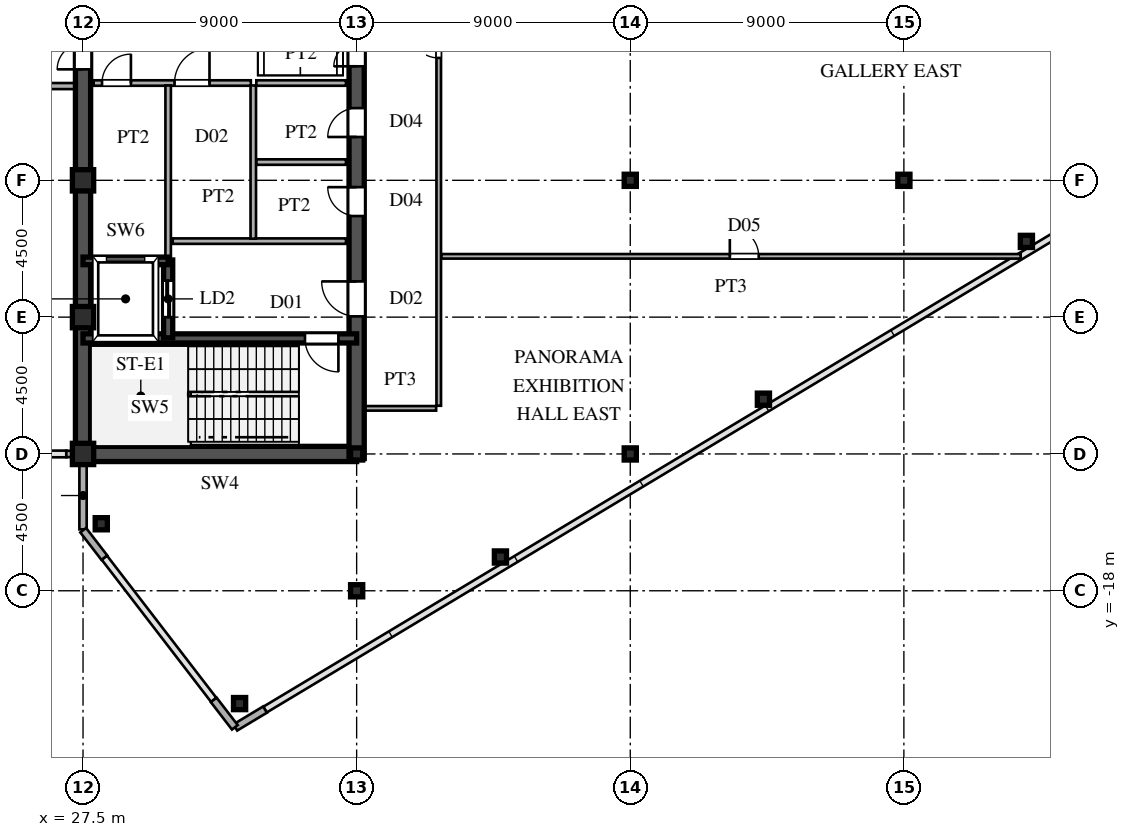
"""IFC4 building model, lengths in metres.
Left out: names, types, materials, properties, quantities, classifications, styles, units other than length and angle.
Written with IfcOpenShell. Run it as: python <this file> out.ifc"""

import sys

from ifc_helpers import new_model, si_unit, direction, frame, frame_2d, origin, origin_2d, place, context, subcontext, project, spatial, rectangle, hollow_rectangle, i_section, extrude, source, transform, mapped, element, fill, save


model = new_model("IFC4")
c1 = context("Model", 3, precision=1e-05, world=origin(), true_north=direction((0.0, 1.0)))
c2 = subcontext(c1, "Body", "Model", "MODEL_VIEW")
j1 = project(units=[si_unit("LENGTHUNIT", "METRE"), si_unit("PLANEANGLEUNIT", "RADIAN")], contexts=[c1])
p1 = place(None, origin())
s1 = spatial("IfcSite", under=j1, at=p1, CompositionType="ELEMENT")
p2 = place(p1, origin())
s2 = spatial("IfcBuilding", under=s1, at=p2, CompositionType="ELEMENT")
p3 = place(p2, frame((0.0, 0.0, 269.4)))
s3 = spatial("IfcBuildingStorey", under=s2, at=p3, CompositionType="ELEMENT", Elevation=269.4)
m1 = source(origin(), c2, "Body", "SweptSolid", [
    extrude(hollow_rectangle(XDim=0.7, YDim=0.7, WallThickness=0.03, at=origin_2d()), origin(), (0.0, 0.0, 1.0), 4.8),
])
for number, where, z_axis, x_axis in (
    (1, (27.5, -13.5, 0.0), (0.0, 0.0, 1.0), (1.0, 0.0, 0.0)),
    (2, (27.5, -9.0, 0.0), (0.0, 0.0, 1.0), (1.0, 0.0, 0.0)),
    (3, (27.5, -4.5, 0.0), (0.0, 0.0, 1.0), (1.0, 0.0, 0.0)),
):
    element("IfcColumn", number, at=place(p3, frame(where, z_axis=z_axis, x_axis=x_axis)), inside=s3, PredefinedType="COLUMN", context=c2, shape_type="MappedRepresentation", body=[
        mapped(m1, transform((0.0, 0.0, 0.0), scale=1.0)),
    ])
m2 = source(origin(), c2, "Body", "SweptSolid", [
    extrude(i_section(OverallWidth=0.4, OverallDepth=0.4, WebThickness=0.013, FlangeThickness=0.021, at=origin_2d()), origin(), (0.0, 0.0, 1.0), 4.8),
])
for number, where, z_axis, x_axis in (
    (4, (36.5, -18.0, 0.0), (0.0, 0.0, 1.0), (1.0, 0.0, 0.0)),
    (5, (36.5, -13.5, 0.0), (0.0, 0.0, 1.0), (1.0, 0.0, 0.0)),
    (6, (45.5, -13.5, 0.0), (0.0, 0.0, 1.0), (1.0, 0.0, 0.0)),
    (7, (45.5, -4.5, 0.0), (0.0, 0.0, 1.0), (1.0, 0.0, 0.0)),
    (8, (54.5, -4.5, 0.0), (0.0, 0.0, 1.0), (1.0, 0.0, 0.0)),
):
    element("IfcColumn", number, at=place(p3, frame(where, z_axis=z_axis, x_axis=x_axis)), inside=s3, PredefinedType="COLUMN", context=c2, shape_type="MappedRepresentation", body=[
        mapped(m2, transform((0.0, 0.0, 0.0), scale=1.0)),
    ])
m3 = source(origin(), c2, "Body", "SweptSolid", [
    extrude(hollow_rectangle(XDim=0.4, YDim=0.4, WallThickness=0.016, at=origin_2d()), origin(), (0.0, 0.0, 1.0), 4.8),
])
for number, where, z_axis, x_axis in (
    (9, (32.65, -21.71, 0.0), (0.0, 0.0, 1.0), (1.0, 0.0, 0.0)),
    (10, (28.1, -15.796, 0.0), (0.0, 0.0, 1.0), (1.0, 0.0, 0.0)),
    (11, (41.23, -16.889, 0.0), (0.0, 0.0, 1.0), (1.0, 0.0, 0.0)),
    (12, (49.88, -11.699, 0.0), (0.0, 0.0, 1.0), (1.0, 0.0, 0.0)),
    (13, (58.53, -6.509, 0.0), (0.0, 0.0, 1.0), (1.0, 0.0, 0.0)),
):
    element("IfcColumn", number, at=place(p3, frame(where, z_axis=z_axis, x_axis=x_axis)), inside=s3, PredefinedType="COLUMN", context=c2, shape_type="MappedRepresentation", body=[
        mapped(m3, transform((0.0, 0.0, 0.0), scale=1.0)),
    ])
p4 = place(p3, frame((32.509, -22.495, 0.0), z_axis=(0.0, 0.0, 1.0), x_axis=(0.85743623509, 0.514590228002, 0.0)))
e14 = element("IfcWall", 14, at=p4, inside=s3, PredefinedType="SOLIDWALL", context=c2, shape_type="SweptSolid", body=[
    extrude(rectangle(XDim=1.14, YDim=0.24, at=frame_2d((0.57, 0.0))), origin(), (0.0, 0.0, 1.0), 4.54),
])
p5 = place(p3, frame((27.5, -15.98, 0.0), z_axis=(0.0, 0.0, 1.0), x_axis=(0.0, 1.0, 0.0)))
e15 = element("IfcWall", 15, at=p5, inside=s3, PredefinedType="SOLIDWALL", context=c2, shape_type="SweptSolid", body=[
    extrude(rectangle(XDim=1.605, YDim=0.24, at=frame_2d((0.803, 0.0))), origin(), (0.0, 0.0, 1.0), 4.54),
])
p6 = place(p3, frame((27.5, -14.375, 0.0), z_axis=(0.0, 0.0, 1.0), x_axis=(0.0, 1.0, 0.0)))
e16 = element("IfcWall", 16, at=p6, inside=s3, PredefinedType="SOLIDWALL", context=c2, shape_type="SweptSolid", body=[
    extrude(rectangle(XDim=0.62, YDim=0.24, at=frame_2d((0.31, 0.0))), origin(), (0.0, 0.0, 1.0), 4.04),
])
for number, where, z_axis, x_axis in (
    (17, (27.506, -16.008, 0.0), (0.0, 0.0, 1.0), (0.61, -0.793, 0.0)),
    (18, (31.799, -21.588, 0.0), (0.0, 0.0, 1.0), (0.61, -0.793, 0.0)),
):
    element("IfcWall", number, at=place(p3, frame(where, z_axis=z_axis, x_axis=x_axis)), inside=s3, PredefinedType="SOLIDWALL", context=c2, shape_type="SweptSolid", body=[
        extrude(rectangle(XDim=1.14, YDim=0.24, at=frame_2d((0.57, 0.0))), origin(), (0.0, 0.0, 1.0), 4.54),
    ])
p7 = place(p3, frame((26.95, -13.5, 0.0), z_axis=(0.0, 0.0, 1.0), x_axis=(1.0, 0.0, 0.0)))
e19 = element("IfcWall", 19, at=p7, inside=s3, PredefinedType="SOLIDWALL", context=c2, shape_type="SweptSolid", body=[
    extrude(rectangle(XDim=0.54, YDim=0.21, at=frame_2d((0.27, 0.0))), origin(), (0.0, 0.0, 1.0), 4.04),
])
p8 = place(p3, frame((27.5, -13.5, 0.0), z_axis=(0.0, 0.0, 1.0), x_axis=(0.0, 1.0, 0.0)))
e20 = element("IfcWall", 20, at=p8, inside=s3, PredefinedType="SHEAR", context=c2, shape_type="SweptSolid", body=[
    extrude(rectangle(XDim=12.2, YDim=0.5, at=frame_2d((6.1, 0.0))), origin(), (0.0, 0.0, 1.0), 4.54),
])
p9 = place(p3, frame((27.5, -1.3, 0.0), z_axis=(0.0, 0.0, 1.0), x_axis=(0.0, 1.0, 0.0)))
e21 = element("IfcWall", 21, at=p9, inside=s3, PredefinedType="SHEAR", context=c2, shape_type="SweptSolid", body=[
    extrude(rectangle(XDim=2.6, YDim=0.5, at=frame_2d((1.3, 0.0))), origin(), (0.0, 0.0, 1.0), 4.54),
])
p10 = place(p9, frame((0.45, 0.0, 0.0)))
e22 = element("IfcOpeningElement", 22, at=p10, cuts=e21, PredefinedType="OPENING", context=c2, shape_type="SweptSolid", body=[
    extrude(rectangle(XDim=1.7, YDim=2.35, at=frame_2d((0.85, 1.175))), frame((0.0, 0.26, 0.0), z_axis=(0.0, -1.0, 0.0), x_axis=(1.0, 0.0, 0.0)), (0.0, 0.0, 1.0), 0.52),
])
p11 = place(p3, frame((27.5, -13.5, 0.0), z_axis=(0.0, 0.0, 1.0), x_axis=(1.0, 0.0, 0.0)))
e23 = element("IfcWall", 23, at=p11, inside=s3, PredefinedType="SHEAR", context=c2, shape_type="SweptSolid", body=[
    extrude(rectangle(XDim=9.0, YDim=0.5, at=frame_2d((4.5, 0.0))), origin(), (0.0, 0.0, 1.0), 4.54),
])
p12 = place(p3, frame((36.5, -13.65, 0.0), z_axis=(0.0, 0.0, 1.0), x_axis=(0.0, 1.0, 0.0)))
e24 = element("IfcWall", 24, at=p12, inside=s3, PredefinedType="SHEAR", context=c2, shape_type="SweptSolid", body=[
    extrude(rectangle(XDim=7.15, YDim=0.5, at=frame_2d((3.575, 0.0))), origin(), (0.0, 0.0, 1.0), 4.54),
])
p13 = place(p12, frame((4.675, 0.0, 0.0)))
e25 = element("IfcOpeningElement", 25, at=p13, cuts=e24, PredefinedType="OPENING", context=c2, shape_type="SweptSolid", body=[
    extrude(rectangle(XDim=1.15, YDim=2.2, at=frame_2d((0.575, 1.1))), frame((0.0, 0.26, 0.0), z_axis=(0.0, -1.0, 0.0), x_axis=(1.0, 0.0, 0.0)), (0.0, 0.0, 1.0), 0.52),
])
p14 = place(p3, frame((36.5, -1.3, 0.0), z_axis=(0.0, 0.0, 1.0), x_axis=(0.0, 1.0, 0.0)))
e26 = element("IfcWall", 26, at=p14, inside=s3, PredefinedType="SHEAR", context=c2, shape_type="SweptSolid", body=[
    extrude(rectangle(XDim=2.6, YDim=0.5, at=frame_2d((1.3, 0.0))), origin(), (0.0, 0.0, 1.0), 4.54),
])
p15 = place(p14, frame((0.55, 0.0, 0.0)))
e27 = element("IfcOpeningElement", 27, at=p15, cuts=e26, PredefinedType="OPENING", context=c2, shape_type="SweptSolid", body=[
    extrude(rectangle(XDim=1.5, YDim=2.3, at=frame_2d((0.75, 1.15))), frame((0.0, 0.26, 0.0), z_axis=(0.0, -1.0, 0.0), x_axis=(1.0, 0.0, 0.0)), (0.0, 0.0, 1.0), 0.52),
])
p16 = place(p3, frame((36.5, -6.5, 0.0), z_axis=(0.0, 0.0, 1.0), x_axis=(0.0, 1.0, 0.0)))
e28 = element("IfcWall", 28, at=p16, inside=s3, PredefinedType="SHEAR", context=c2, shape_type="SweptSolid", body=[
    extrude(rectangle(XDim=2.6, YDim=0.5, at=frame_2d((1.3, 0.0))), origin(), (0.0, 0.0, 1.0), 4.54),
])
p17 = place(p16, frame((0.825, 0.0, 0.0)))
e29 = element("IfcOpeningElement", 29, at=p17, cuts=e28, PredefinedType="OPENING", context=c2, shape_type="SweptSolid", body=[
    extrude(rectangle(XDim=0.95, YDim=2.15, at=frame_2d((0.475, 1.075))), frame((0.0, 0.26, 0.0), z_axis=(0.0, -1.0, 0.0), x_axis=(1.0, 0.0, 0.0)), (0.0, 0.0, 1.0), 0.52),
])
p18 = place(p3, frame((36.5, -3.9, 0.0), z_axis=(0.0, 0.0, 1.0), x_axis=(0.0, 1.0, 0.0)))
e30 = element("IfcWall", 30, at=p18, inside=s3, PredefinedType="SHEAR", context=c2, shape_type="SweptSolid", body=[
    extrude(rectangle(XDim=2.6, YDim=0.5, at=frame_2d((1.3, 0.0))), origin(), (0.0, 0.0, 1.0), 4.54),
])
p19 = place(p18, frame((0.825, 0.0, 0.0)))
e31 = element("IfcOpeningElement", 31, at=p19, cuts=e30, PredefinedType="OPENING", context=c2, shape_type="SweptSolid", body=[
    extrude(rectangle(XDim=0.95, YDim=2.15, at=frame_2d((0.475, 1.075))), frame((0.0, 0.26, 0.0), z_axis=(0.0, -1.0, 0.0), x_axis=(1.0, 0.0, 0.0)), (0.0, 0.0, 1.0), 0.52),
])
p20 = place(p3, frame((27.5, -9.7, 0.0), z_axis=(0.0, 0.0, 1.0), x_axis=(1.0, 0.0, 0.0)))
e32 = element("IfcWall", 32, at=p20, inside=s3, PredefinedType="SHEAR", context=c2, shape_type="SweptSolid", body=[
    extrude(rectangle(XDim=9.0, YDim=0.3, at=frame_2d((4.5, 0.0))), origin(), (0.0, 0.0, 1.0), 4.54),
])
p21 = place(p20, frame((7.3, 0.0, 0.0)))
e33 = element("IfcOpeningElement", 33, at=p21, cuts=e32, PredefinedType="OPENING", context=c2, shape_type="SweptSolid", body=[
    extrude(rectangle(XDim=1.1, YDim=2.2, at=frame_2d((0.55, 1.1))), frame((0.0, 0.16, 0.0), z_axis=(0.0, -1.0, 0.0), x_axis=(1.0, 0.0, 0.0)), (0.0, 0.0, 1.0), 0.32),
])
p22 = place(p3, frame((27.5, -7.15, 0.0), z_axis=(0.0, 0.0, 1.0), x_axis=(1.0, 0.0, 0.0)))
e34 = element("IfcWall", 34, at=p22, inside=s3, PredefinedType="SHEAR", context=c2, shape_type="SweptSolid", body=[
    extrude(rectangle(XDim=2.8, YDim=0.25, at=frame_2d((1.4, 0.0))), origin(), (0.0, 0.0, 1.0), 4.54),
])
p23 = place(p3, frame((30.3, -9.68, 0.0), z_axis=(0.0, 0.0, 1.0), x_axis=(0.0, 1.0, 0.0)))
e35 = element("IfcWall", 35, at=p23, inside=s3, PredefinedType="SHEAR", context=c2, shape_type="SweptSolid", body=[
    extrude(rectangle(XDim=2.56, YDim=0.3, at=frame_2d((1.28, 0.0))), origin(), (0.0, 0.0, 1.0), 4.54),
])
p24 = place(p23, frame((0.68, 0.0, 0.0)))
e36 = element("IfcOpeningElement", 36, at=p24, cuts=e35, PredefinedType="OPENING", context=c2, shape_type="SweptSolid", body=[
    extrude(rectangle(XDim=1.2, YDim=2.25, at=frame_2d((0.6, 1.125))), frame((0.0, 0.16, 0.0), z_axis=(0.0, -1.0, 0.0), x_axis=(1.0, 0.0, 0.0)), (0.0, 0.0, 1.0), 0.32),
])
p25 = place(p3, frame((30.45, -6.5, 0.0), z_axis=(0.0, 0.0, 1.0), x_axis=(1.0, 0.0, 0.0)))
e37 = element("IfcWall", 37, at=p25, inside=s3, PredefinedType="PARTITIONING", context=c2, shape_type="SweptSolid", body=[
    extrude(rectangle(XDim=5.7, YDim=0.18, at=frame_2d((2.85, 0.0))), origin(), (0.0, 0.0, 1.0), 4.54),
])
p26 = place(p3, frame((33.1, -6.42, 0.0), z_axis=(0.0, 0.0, 1.0), x_axis=(0.0, 1.0, 0.0)))
e38 = element("IfcWall", 38, at=p26, inside=s3, PredefinedType="PARTITIONING", context=c2, shape_type="SweptSolid", body=[
    extrude(rectangle(XDim=5.04, YDim=0.18, at=frame_2d((2.52, 0.0))), origin(), (0.0, 0.0, 1.0), 4.54),
])
p27 = place(p3, frame((27.85, -1.3, 0.0), z_axis=(0.0, 0.0, 1.0), x_axis=(1.0, 0.0, 0.0)))
e39 = element("IfcWall", 39, at=p27, inside=s3, PredefinedType="PARTITIONING", context=c2, shape_type="SweptSolid", body=[
    extrude(rectangle(XDim=2.45, YDim=0.18, at=frame_2d((1.225, 0.0))), origin(), (0.0, 0.0, 1.0), 4.54),
])
p28 = place(p27, frame((0.275, 0.0, 0.0)))
e40 = element("IfcOpeningElement", 40, at=p28, cuts=e39, PredefinedType="OPENING", context=c2, shape_type="SweptSolid", body=[
    extrude(rectangle(XDim=0.95, YDim=2.15, at=frame_2d((0.475, 1.075))), frame((0.0, 0.1, 0.0), z_axis=(0.0, -1.0, 0.0), x_axis=(1.0, 0.0, 0.0)), (0.0, 0.0, 1.0), 0.2),
])
p29 = place(p3, frame((30.3, -1.3, 0.0), z_axis=(0.0, 0.0, 1.0), x_axis=(1.0, 0.0, 0.0)))
e41 = element("IfcWall", 41, at=p29, inside=s3, PredefinedType="PARTITIONING", context=c2, shape_type="SweptSolid", body=[
    extrude(rectangle(XDim=2.72, YDim=0.18, at=frame_2d((1.36, 0.0))), origin(), (0.0, 0.0, 1.0), 4.54),
])
p30 = place(p29, frame((0.21, 0.0, 0.0)))
e42 = element("IfcOpeningElement", 42, at=p30, cuts=e41, PredefinedType="OPENING", context=c2, shape_type="SweptSolid", body=[
    extrude(rectangle(XDim=1.15, YDim=2.2, at=frame_2d((0.575, 1.1))), frame((0.0, 0.1, 0.0), z_axis=(0.0, -1.0, 0.0), x_axis=(1.0, 0.0, 0.0)), (0.0, 0.0, 1.0), 0.2),
])
p31 = place(p3, frame((30.3, -7.12, 0.0), z_axis=(0.0, 0.0, 1.0), x_axis=(0.0, 1.0, 0.0)))
e43 = element("IfcWall", 43, at=p31, inside=s3, PredefinedType="PARTITIONING", context=c2, shape_type="SweptSolid", body=[
    extrude(rectangle(XDim=5.74, YDim=0.18, at=frame_2d((2.87, 0.0))), origin(), (0.0, 0.0, 1.0), 4.54),
])
for number, where, z_axis, x_axis in (
    (44, (33.2, -1.3, 0.0), (0.0, 0.0, 1.0), (1.0, 0.0, 0.0)),
    (45, (33.2, -3.9, 0.0), (0.0, 0.0, 1.0), (1.0, 0.0, 0.0)),
):
    element("IfcWall", number, at=place(p3, frame(where, z_axis=z_axis, x_axis=x_axis)), inside=s3, PredefinedType="PARTITIONING", context=c2, shape_type="SweptSolid", body=[
        extrude(rectangle(XDim=2.95, YDim=0.18, at=frame_2d((1.475, 0.0))), origin(), (0.0, 0.0, 1.0), 4.54),
    ])
p32 = place(p3, frame((36.755, -12.0, 0.0), z_axis=(0.0, 0.0, 1.0), x_axis=(1.0, 0.0, 0.0)))
e46 = element("IfcWall", 46, at=p32, inside=s3, PredefinedType="PARTITIONING", context=c2, shape_type="SweptSolid", body=[
    extrude(rectangle(XDim=2.36, YDim=0.15, at=frame_2d((1.18, 0.0))), origin(), (0.0, 0.0, 1.0), 4.54),
])
p33 = place(p3, frame((39.285, -7.0, 0.0), z_axis=(0.0, 0.0, 1.0), x_axis=(1.0, 0.0, 0.0)))
e47 = element("IfcWall", 47, at=p33, inside=s3, PredefinedType="PARTITIONING", context=c2, shape_type="SweptSolid", body=[
    extrude(rectangle(XDim=19.058, YDim=0.15, at=frame_2d((9.529, 0.0))), origin(), (0.0, 0.0, 1.0), 4.54),
])
p34 = place(p33, frame((9.49, 0.0, 0.0)))
e48 = element("IfcOpeningElement", 48, at=p34, cuts=e47, PredefinedType="OPENING", context=c2, shape_type="SweptSolid", body=[
    extrude(rectangle(XDim=0.95, YDim=2.15, at=frame_2d((0.475, 1.075))), frame((0.0, 0.085, 0.0), z_axis=(0.0, -1.0, 0.0), x_axis=(1.0, 0.0, 0.0)), (0.0, 0.0, 1.0), 0.17),
])
p35 = place(p3, frame((-27.245, -1.4, 0.0), z_axis=(0.0, 0.0, 1.0), x_axis=(1.0, 0.0, 0.0)))
e49 = element("IfcWall", 49, at=p35, inside=s3, PredefinedType="PARTITIONING", context=c2, shape_type="SweptSolid", body=[
    extrude(rectangle(XDim=54.49, YDim=0.2, at=frame_2d((27.245, 0.0))), origin(), (0.0, 0.0, 1.0), 4.54),
])
p36 = place(p35, frame((17.67, 0.0, 0.0)))
e50 = element("IfcOpeningElement", 50, at=p36, cuts=e49, PredefinedType="OPENING", context=c2, shape_type="SweptSolid", body=[
    extrude(rectangle(XDim=1.15, YDim=2.2, at=frame_2d((0.575, 1.1))), frame((0.0, 0.11, 0.0), z_axis=(0.0, -1.0, 0.0), x_axis=(1.0, 0.0, 0.0)), (0.0, 0.0, 1.0), 0.22),
])
p37 = place(p35, frame((35.17, 0.0, 0.0)))
e51 = element("IfcOpeningElement", 51, at=p37, cuts=e49, PredefinedType="OPENING", context=c2, shape_type="SweptSolid", body=[
    extrude(rectangle(XDim=1.15, YDim=2.2, at=frame_2d((0.575, 1.1))), frame((0.0, 0.11, 0.0), z_axis=(0.0, -1.0, 0.0), x_axis=(1.0, 0.0, 0.0)), (0.0, 0.0, 1.0), 0.22),
])
p38 = place(p3, frame((39.2, -11.915, 0.0), z_axis=(0.0, 0.0, 1.0), x_axis=(0.0, 1.0, 0.0)))
e52 = element("IfcWall", 52, at=p38, inside=s3, PredefinedType="PARTITIONING", context=c2, shape_type="SweptSolid", body=[
    extrude(rectangle(XDim=23.83, YDim=0.15, at=frame_2d((11.915, 0.0))), origin(), (0.0, 0.0, 1.0), 4.54),
])
p39 = place(p38, frame((11.44, 0.0, 0.0)))
e53 = element("IfcOpeningElement", 53, at=p39, cuts=e52, PredefinedType="OPENING", context=c2, shape_type="SweptSolid", body=[
    extrude(rectangle(XDim=0.95, YDim=2.15, at=frame_2d((0.475, 1.075))), frame((0.0, 0.085, 0.0), z_axis=(0.0, -1.0, 0.0), x_axis=(1.0, 0.0, 0.0)), (0.0, 0.0, 1.0), 0.17),
])
m4 = source(origin(), c2, "Body", "SweptSolid", [
    extrude(rectangle(XDim=1.7, YDim=2.35, at=frame_2d((0.85, 1.175))), frame((0.0, 0.025, 0.0), z_axis=(0.0, -1.0, 0.0), x_axis=(1.0, 0.0, 0.0)), (0.0, 0.0, 1.0), 0.05),
])
p40 = place(p10, origin())
e54 = element("IfcDoor", 54, at=p40, inside=s3, OperationType="DOUBLE_SWING_LEFT", PredefinedType="DOOR", context=c2, shape_type="MappedRepresentation", body=[
    mapped(m4, transform((0.0, 0.0, 0.0), scale=1.0)),
])
fill(e22, e54)
m5 = source(origin(), c2, "Body", "SweptSolid", [
    extrude(rectangle(XDim=1.15, YDim=2.2, at=frame_2d((0.575, 1.1))), frame((0.0, 0.025, 0.0), z_axis=(0.0, -1.0, 0.0), x_axis=(1.0, 0.0, 0.0)), (0.0, 0.0, 1.0), 0.05),
])
p41 = place(p13, origin())
e55 = element("IfcDoor", 55, at=p41, inside=s3, OperationType="SINGLE_SWING_RIGHT", PredefinedType="DOOR", context=c2, shape_type="MappedRepresentation", body=[
    mapped(m5, transform((0.0, 0.0, 0.0), scale=1.0)),
])
fill(e25, e55)
m6 = source(origin(), c2, "Body", "SweptSolid", [
    extrude(rectangle(XDim=1.5, YDim=2.3, at=frame_2d((0.75, 1.15))), frame((0.0, 0.025, 0.0), z_axis=(0.0, -1.0, 0.0), x_axis=(1.0, 0.0, 0.0)), (0.0, 0.0, 1.0), 0.05),
])
p42 = place(p15, origin())
e56 = element("IfcDoor", 56, at=p42, inside=s3, OperationType="DOUBLE_SWING_LEFT", PredefinedType="DOOR", context=c2, shape_type="MappedRepresentation", body=[
    mapped(m6, transform((0.0, 0.0, 0.0), scale=1.0)),
])
fill(e27, e56)
m7 = source(origin(), c2, "Body", "SweptSolid", [
    extrude(rectangle(XDim=0.95, YDim=2.15, at=frame_2d((0.475, 1.075))), frame((0.0, 0.025, 0.0), z_axis=(0.0, -1.0, 0.0), x_axis=(1.0, 0.0, 0.0)), (0.0, 0.0, 1.0), 0.05),
])
p43 = place(p17, origin())
e57 = element("IfcDoor", 57, at=p43, inside=s3, OperationType="SINGLE_SWING_RIGHT", PredefinedType="DOOR", context=c2, shape_type="MappedRepresentation", body=[
    mapped(m7, transform((0.0, 0.0, 0.0), scale=1.0)),
])
fill(e29, e57)
p44 = place(p19, origin())
e58 = element("IfcDoor", 58, at=p44, inside=s3, OperationType="SINGLE_SWING_LEFT", PredefinedType="DOOR", context=c2, shape_type="MappedRepresentation", body=[
    mapped(m7, transform((0.0, 0.0, 0.0), scale=1.0)),
])
fill(e31, e58)
m8 = source(origin(), c2, "Body", "SweptSolid", [
    extrude(rectangle(XDim=1.1, YDim=2.2, at=frame_2d((0.55, 1.1))), frame((0.0, 0.025, 0.0), z_axis=(0.0, -1.0, 0.0), x_axis=(1.0, 0.0, 0.0)), (0.0, 0.0, 1.0), 0.05),
])
p45 = place(p21, frame((1.1, 0.0, 0.0), z_axis=(0.0, 0.0, 1.0), x_axis=(-1.0, 0.0, 0.0)))
e59 = element("IfcDoor", 59, at=p45, inside=s3, OperationType="SINGLE_SWING_RIGHT", PredefinedType="DOOR", context=c2, shape_type="MappedRepresentation", body=[
    mapped(m8, transform((0.0, 0.0, 0.0), scale=1.0)),
])
fill(e33, e59)
m9 = source(origin(), c2, "Body", "SweptSolid", [
    extrude(rectangle(XDim=1.2, YDim=2.25, at=frame_2d((0.6, 1.125))), frame((0.0, 0.025, 0.0), z_axis=(0.0, -1.0, 0.0), x_axis=(1.0, 0.0, 0.0)), (0.0, 0.0, 1.0), 0.05),
])
p46 = place(p24, origin())
e60 = element("IfcDoor", 60, at=p46, inside=s3, OperationType="DOUBLE_DOOR_SLIDING", PredefinedType="DOOR", context=c2, shape_type="MappedRepresentation", body=[
    mapped(m9, transform((0.0, 0.0, 0.0), scale=1.0)),
])
fill(e36, e60)
p47 = place(p28, origin())
e61 = element("IfcDoor", 61, at=p47, inside=s3, OperationType="SINGLE_SWING_RIGHT", PredefinedType="DOOR", context=c2, shape_type="MappedRepresentation", body=[
    mapped(m7, transform((0.0, 0.0, 0.0), scale=1.0)),
])
fill(e40, e61)
p48 = place(p30, origin())
e62 = element("IfcDoor", 62, at=p48, inside=s3, OperationType="SINGLE_SWING_RIGHT", PredefinedType="DOOR", context=c2, shape_type="MappedRepresentation", body=[
    mapped(m5, transform((0.0, 0.0, 0.0), scale=1.0)),
])
fill(e42, e62)
m10 = source(origin(), c2, "Body", "SweptSolid", [
    extrude(rectangle(XDim=0.95, YDim=2.15, at=frame_2d((0.475, 1.075))), frame((0.0, 0.025, 0.0), z_axis=(0.0, -1.0, 0.0), x_axis=(1.0, 0.0, 0.0)), (0.0, 0.0, 1.0), 0.05),
])
p49 = place(p34, origin())
e63 = element("IfcDoor", 63, at=p49, inside=s3, OperationType="SINGLE_SWING_LEFT", PredefinedType="DOOR", context=c2, shape_type="MappedRepresentation", body=[
    mapped(m10, transform((0.0, 0.0, 0.0), scale=1.0)),
])
fill(e48, e63)
p50 = place(p39, origin())
e64 = element("IfcDoor", 64, at=p50, inside=s3, OperationType="SINGLE_SWING_RIGHT", PredefinedType="DOOR", context=c2, shape_type="MappedRepresentation", body=[
    mapped(m10, transform((0.0, 0.0, 0.0), scale=1.0)),
])
fill(e53, e64)
save(model, sys.argv[1])
